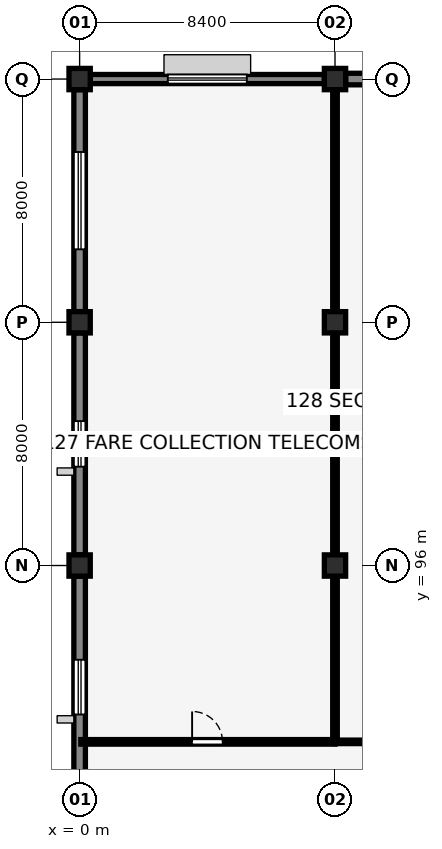
"""IFC4 building model, lengths in metres.
Left out: names, types, materials, properties, quantities, classifications, styles, units other than length and angle.
Written with IfcOpenShell. Run it as: python <this file> out.ifc"""

import sys

from ifc_helpers import new_model, si_unit, direction, frame, frame_2d, origin, origin_2d, place, context, subcontext, project, spatial, rectangle, extrude, element, fill, save


model = new_model("IFC4")
c1 = context("Model", 3, precision=1e-05, world=origin(), true_north=direction((0.0, 1.0)))
c2 = subcontext(c1, "Body", "Model", "MODEL_VIEW")
j1 = project(units=[si_unit("LENGTHUNIT", "METRE"), si_unit("PLANEANGLEUNIT", "RADIAN")], contexts=[c1])
p1 = place(None, origin())
s1 = spatial("IfcSite", under=j1, at=p1, CompositionType="ELEMENT")
p2 = place(p1, origin())
s2 = spatial("IfcBuilding", under=s1, at=p2, CompositionType="ELEMENT")
p3 = place(p2, frame((0.0, 0.0, 5.44)))
s3 = spatial("IfcBuildingStorey", under=s2, at=p3, CompositionType="ELEMENT", Elevation=5.44)
for number, where, z_axis, x_axis in (
    (1, (0.0, 96.0, 0.0), (0.0, 0.0, 1.0), (1.0, 0.0, 0.0)),
    (2, (0.0, 104.0, 0.0), (0.0, 0.0, 1.0), (1.0, 0.0, 0.0)),
    (3, (0.0, 112.0, 0.0), (0.0, 0.0, 1.0), (1.0, 0.0, 0.0)),
    (4, (8.4, 96.0, 0.0), (0.0, 0.0, 1.0), (1.0, 0.0, 0.0)),
    (5, (8.4, 104.0, 0.0), (0.0, 0.0, 1.0), (1.0, 0.0, 0.0)),
    (6, (8.4, 112.0, 0.0), (0.0, 0.0, 1.0), (1.0, 0.0, 0.0)),
):
    element("IfcColumn", number, at=place(p3, frame(where, z_axis=z_axis, x_axis=x_axis)), inside=s3, PredefinedType="COLUMN", context=c2, shape_type="SweptSolid", body=[
        extrude(rectangle(XDim=0.7, YDim=0.7, at=origin_2d()), origin(), (0.0, 0.0, 1.0), 3.8),
    ])
p4 = place(p3, frame((0.0, 88.35, 0.0), z_axis=(0.0, 0.0, 1.0), x_axis=(0.0, 1.0, 0.0)))
e7 = element("IfcWall", 7, at=p4, inside=s3, PredefinedType="SOLIDWALL", context=c2, shape_type="SweptSolid", body=[
    extrude(rectangle(XDim=7.3, YDim=0.38, at=frame_2d((3.65, 0.0))), origin(), (0.0, 0.0, 1.0), 3.442),
])
p5 = place(p4, frame((2.75, 0.0, 0.9), z_axis=(0.0, 0.0, 1.0), x_axis=(1.0, 0.0, 0.0)))
e8 = element("IfcOpeningElement", 8, at=p5, cuts=e7, PredefinedType="OPENING", context=c2, shape_type="SweptSolid", body=[
    extrude(rectangle(XDim=1.8, YDim=1.3, at=frame_2d((0.9, 0.65))), frame((0.0, 0.2, 0.0), z_axis=(0.0, -1.0, 0.0), x_axis=(1.0, 0.0, 0.0)), (0.0, 0.0, 1.0), 0.4),
])
p6 = place(p3, frame((0.0, 96.35, 0.0), z_axis=(0.0, 0.0, 1.0), x_axis=(0.0, 1.0, 0.0)))
e9 = element("IfcWall", 9, at=p6, inside=s3, PredefinedType="SOLIDWALL", context=c2, shape_type="SweptSolid", body=[
    extrude(rectangle(XDim=7.3, YDim=0.38, at=frame_2d((3.65, 0.0))), origin(), (0.0, 0.0, 1.0), 3.442),
])
p7 = place(p6, frame((2.9, 0.0, 0.9), z_axis=(0.0, 0.0, 1.0), x_axis=(1.0, 0.0, 0.0)))
e10 = element("IfcOpeningElement", 10, at=p7, cuts=e9, PredefinedType="OPENING", context=c2, shape_type="SweptSolid", body=[
    extrude(rectangle(XDim=1.5, YDim=1.4, at=frame_2d((0.75, 0.7))), frame((0.0, 0.2, 0.0), z_axis=(0.0, -1.0, 0.0), x_axis=(1.0, 0.0, 0.0)), (0.0, 0.0, 1.0), 0.4),
])
p8 = place(p3, frame((0.0, 104.35, 0.0), z_axis=(0.0, 0.0, 1.0), x_axis=(0.0, 1.0, 0.0)))
e11 = element("IfcWall", 11, at=p8, inside=s3, PredefinedType="SOLIDWALL", context=c2, shape_type="SweptSolid", body=[
    extrude(rectangle(XDim=7.3, YDim=0.38, at=frame_2d((3.65, 0.0))), origin(), (0.0, 0.0, 1.0), 3.442),
])
p9 = place(p8, frame((2.05, 0.0, 1.55), z_axis=(0.0, 0.0, 1.0), x_axis=(1.0, 0.0, 0.0)))
e12 = element("IfcOpeningElement", 12, at=p9, cuts=e11, PredefinedType="OPENING", context=c2, shape_type="SweptSolid", body=[
    extrude(rectangle(XDim=3.2, YDim=0.9, at=frame_2d((1.6, 0.45))), frame((0.0, 0.2, 0.0), z_axis=(0.0, -1.0, 0.0), x_axis=(1.0, 0.0, 0.0)), (0.0, 0.0, 1.0), 0.4),
])
p10 = place(p3, frame((0.35, 112.0, 0.0), z_axis=(0.0, 0.0, 1.0), x_axis=(1.0, 0.0, 0.0)))
e13 = element("IfcWall", 13, at=p10, inside=s3, PredefinedType="SOLIDWALL", context=c2, shape_type="SweptSolid", body=[
    extrude(rectangle(XDim=7.7, YDim=0.3, at=frame_2d((3.85, 0.0))), origin(), (0.0, 0.0, 1.0), 3.45),
])
p11 = place(p10, frame((2.55, 0.0, 1.55), z_axis=(0.0, 0.0, 1.0), x_axis=(1.0, 0.0, 0.0)))
e14 = element("IfcOpeningElement", 14, at=p11, cuts=e13, PredefinedType="OPENING", context=c2, shape_type="SweptSolid", body=[
    extrude(rectangle(XDim=2.6, YDim=0.85, at=frame_2d((1.3, 0.425))), frame((0.0, 0.16, 0.0), z_axis=(0.0, -1.0, 0.0), x_axis=(1.0, 0.0, 0.0)), (0.0, 0.0, 1.0), 0.32),
])
p12 = place(p3, frame((8.75, 112.0, 0.0), z_axis=(0.0, 0.0, 1.0), x_axis=(1.0, 0.0, 0.0)))
e15 = element("IfcWall", 15, at=p12, inside=s3, PredefinedType="SOLIDWALL", context=c2, shape_type="SweptSolid", body=[
    extrude(rectangle(XDim=7.7, YDim=0.38, at=frame_2d((3.85, 0.0))), origin(), (0.0, 0.0, 1.0), 3.45),
])
p13 = place(p12, frame((2.8, 0.0, 1.55), z_axis=(0.0, 0.0, 1.0), x_axis=(1.0, 0.0, 0.0)))
e16 = element("IfcOpeningElement", 16, at=p13, cuts=e15, PredefinedType="OPENING", context=c2, shape_type="SweptSolid", body=[
    extrude(rectangle(XDim=2.1, YDim=0.8, at=frame_2d((1.05, 0.4))), frame((0.0, 0.2, 0.0), z_axis=(0.0, -1.0, 0.0), x_axis=(1.0, 0.0, 0.0)), (0.0, 0.0, 1.0), 0.4),
])
p14 = place(p3, frame((0.04, 90.2, 0.0), z_axis=(0.0, 0.0, 1.0), x_axis=(1.0, 0.0, 0.0)))
e17 = element("IfcWall", 17, at=p14, inside=s3, PredefinedType="PARTITIONING", context=c2, shape_type="SweptSolid", body=[
    extrude(rectangle(XDim=8.36, YDim=0.15, at=frame_2d((4.18, 0.0))), origin(), (0.0, 0.0, 1.0), 3.8),
])
p15 = place(p14, frame((3.66, 0.0, 0.0), z_axis=(0.0, 0.0, 1.0), x_axis=(1.0, 0.0, 0.0)))
e18 = element("IfcOpeningElement", 18, at=p15, cuts=e17, PredefinedType="OPENING", context=c2, shape_type="SweptSolid", body=[
    extrude(rectangle(XDim=1.0, YDim=2.15, at=frame_2d((0.5, 1.075))), frame((0.0, 0.085, 0.0), z_axis=(0.0, -1.0, 0.0), x_axis=(1.0, 0.0, 0.0)), (0.0, 0.0, 1.0), 0.17),
])
p16 = place(p3, frame((8.4, 90.2, 0.0), z_axis=(0.0, 0.0, 1.0), x_axis=(1.0, 0.0, 0.0)))
e19 = element("IfcWall", 19, at=p16, inside=s3, PredefinedType="PARTITIONING", context=c2, shape_type="SweptSolid", body=[
    extrude(rectangle(XDim=8.4, YDim=0.115, at=frame_2d((4.2, 0.0))), origin(), (0.0, 0.0, 1.0), 3.8),
])
p17 = place(p16, frame((3.7, 0.0, 0.0), z_axis=(0.0, 0.0, 1.0), x_axis=(1.0, 0.0, 0.0)))
e20 = element("IfcOpeningElement", 20, at=p17, cuts=e19, PredefinedType="OPENING", context=c2, shape_type="SweptSolid", body=[
    extrude(rectangle(XDim=0.92, YDim=2.12, at=frame_2d((0.46, 1.06))), frame((0.0, 0.067, 0.0), z_axis=(0.0, -1.0, 0.0), x_axis=(1.0, 0.0, 0.0)), (0.0, 0.0, 1.0), 0.135),
])
p18 = place(p3, frame((8.4, 90.2, 0.0), z_axis=(0.0, 0.0, 1.0), x_axis=(0.0, 1.0, 0.0)))
e21 = element("IfcWall", 21, at=p18, inside=s3, PredefinedType="PARTITIONING", context=c2, shape_type="SweptSolid", body=[
    extrude(rectangle(XDim=5.46, YDim=0.15, at=frame_2d((2.73, 0.0))), origin(), (0.0, 0.0, 1.0), 3.337),
])
for number, where, z_axis, x_axis in (
    (22, (8.4, 96.34, 0.0), (0.0, 0.0, 1.0), (0.0, 1.0, 0.0)),
    (23, (8.4, 104.34, 0.0), (0.0, 0.0, 1.0), (0.0, 1.0, 0.0)),
):
    element("IfcWall", number, at=place(p3, frame(where, z_axis=z_axis, x_axis=x_axis)), inside=s3, PredefinedType="PARTITIONING", context=c2, shape_type="SweptSolid", body=[
        extrude(rectangle(XDim=7.32, YDim=0.15, at=frame_2d((3.66, 0.0))), origin(), (0.0, 0.0, 1.0), 3.337),
    ])
p19 = place(p5, origin())
e24 = element("IfcWindow", 24, at=p19, inside=s3, PartitioningType="DOUBLE_PANEL_VERTICAL", PredefinedType="WINDOW", context=c2, shape_type="SweptSolid", body=[
    extrude(rectangle(XDim=1.8, YDim=1.3, at=frame_2d((0.9, 0.65))), frame((0.0, 0.03, 0.0), z_axis=(0.0, -1.0, 0.0), x_axis=(1.0, 0.0, 0.0)), (0.0, 0.0, 1.0), 0.06),
])
fill(e8, e24)
p20 = place(p7, origin())
e25 = element("IfcWindow", 25, at=p20, inside=s3, PartitioningType="SINGLE_PANEL", PredefinedType="WINDOW", context=c2, shape_type="SweptSolid", body=[
    extrude(rectangle(XDim=1.5, YDim=1.4, at=frame_2d((0.75, 0.7))), frame((0.0, 0.03, 0.0), z_axis=(0.0, -1.0, 0.0), x_axis=(1.0, 0.0, 0.0)), (0.0, 0.0, 1.0), 0.06),
])
fill(e10, e25)
p21 = place(p9, origin())
e26 = element("IfcWindow", 26, at=p21, inside=s3, PartitioningType="TRIPLE_PANEL_HORIZONTAL", PredefinedType="WINDOW", context=c2, shape_type="SweptSolid", body=[
    extrude(rectangle(XDim=3.2, YDim=0.9, at=frame_2d((1.6, 0.45))), frame((0.0, 0.03, 0.0), z_axis=(0.0, -1.0, 0.0), x_axis=(1.0, 0.0, 0.0)), (0.0, 0.0, 1.0), 0.06),
])
fill(e12, e26)
p22 = place(p11, origin())
e27 = element("IfcWindow", 27, at=p22, inside=s3, PartitioningType="DOUBLE_PANEL_HORIZONTAL", PredefinedType="WINDOW", context=c2, shape_type="SweptSolid", body=[
    extrude(rectangle(XDim=2.6, YDim=0.85, at=frame_2d((1.3, 0.425))), frame((0.0, 0.03, 0.0), z_axis=(0.0, -1.0, 0.0), x_axis=(1.0, 0.0, 0.0)), (0.0, 0.0, 1.0), 0.06),
])
fill(e14, e27)
p23 = place(p15, origin())
e28 = element("IfcDoor", 28, at=p23, inside=s3, OperationType="SINGLE_SWING_LEFT", PredefinedType="DOOR", context=c2, shape_type="SweptSolid", body=[
    extrude(rectangle(XDim=1.0, YDim=2.15, at=frame_2d((0.5, 1.075))), frame((0.0, 0.025, 0.0), z_axis=(0.0, -1.0, 0.0), x_axis=(1.0, 0.0, 0.0)), (0.0, 0.0, 1.0), 0.05),
])
fill(e18, e28)
save(model, sys.argv[1])
